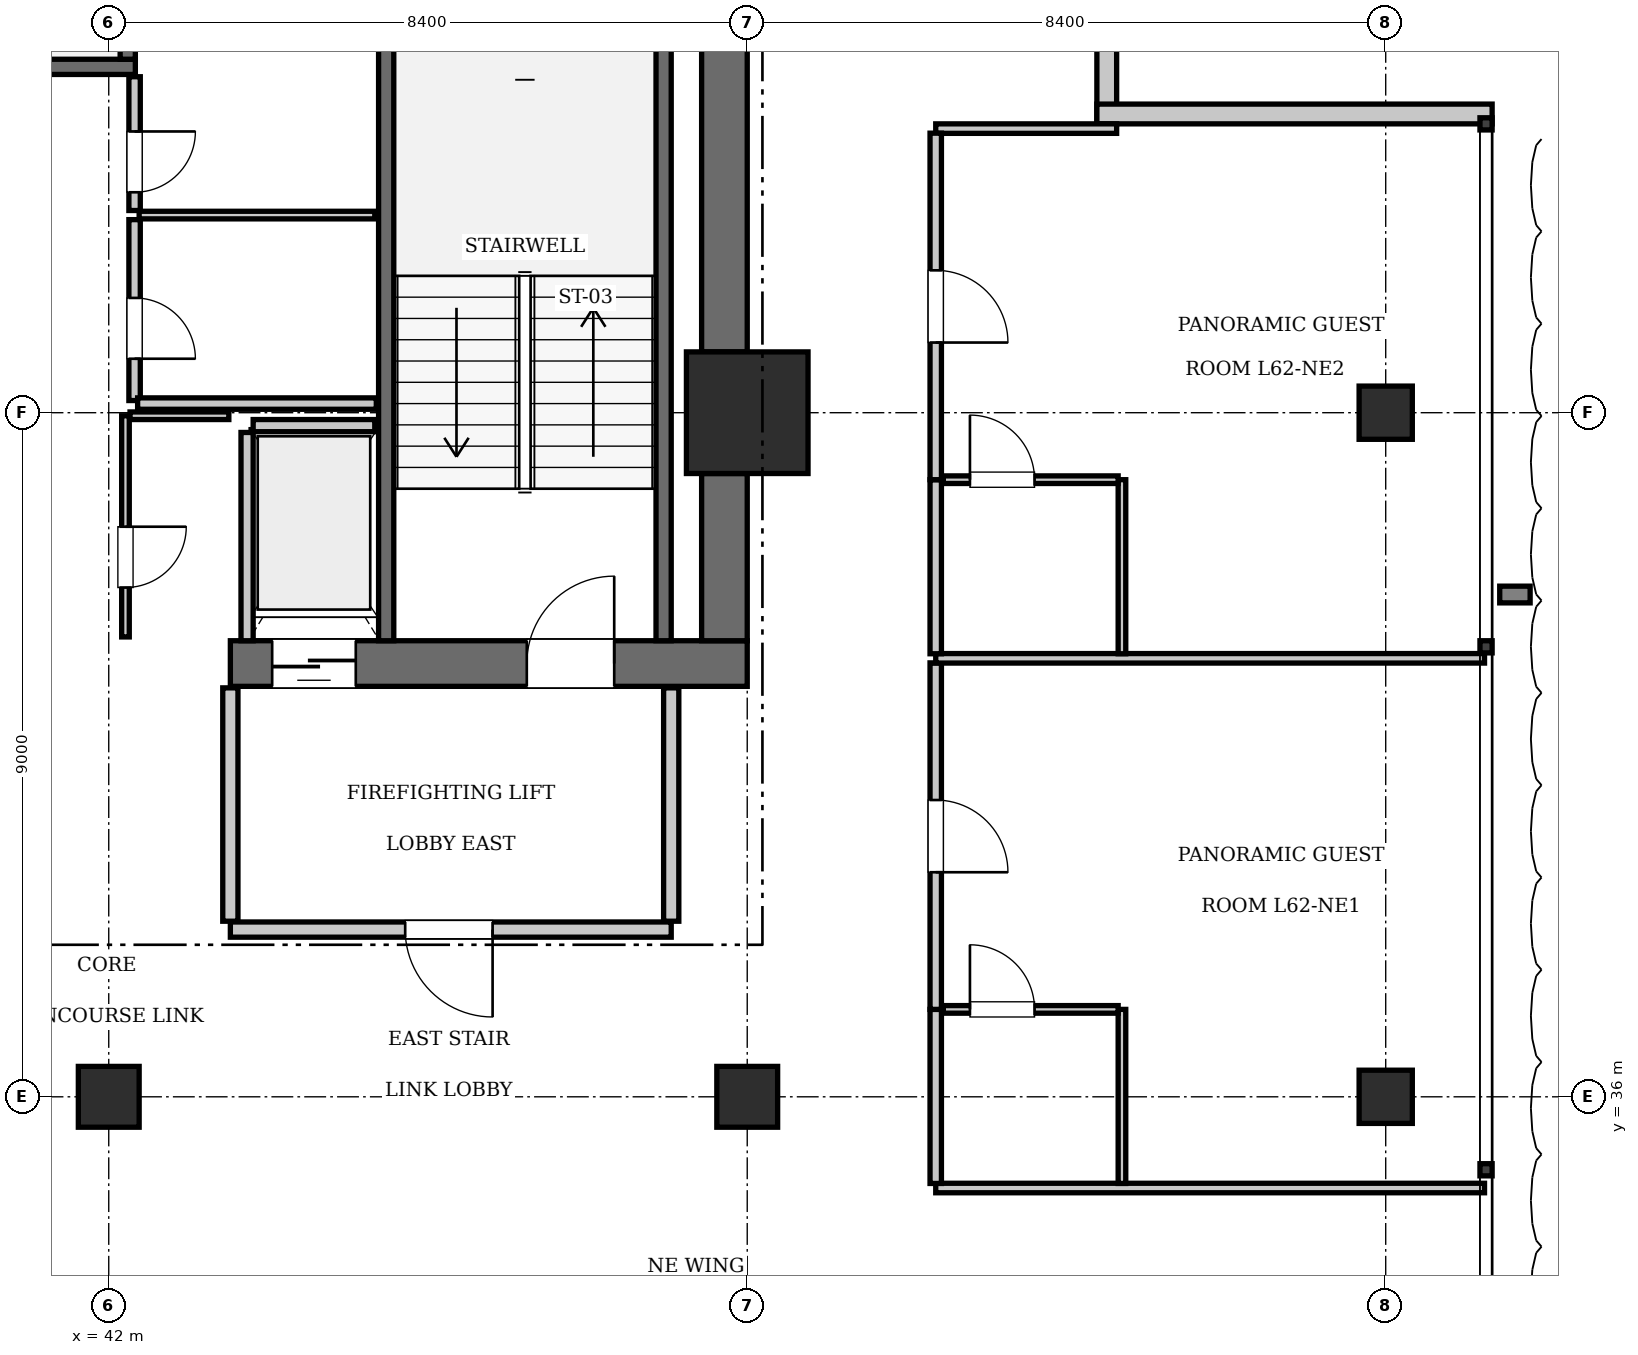
"""IFC4 building model, lengths in metres.
Left out: names, types, materials, properties, quantities, classifications, styles, units other than length and angle.
Written with IfcOpenShell. Run it as: python <this file> out.ifc"""

import sys

from ifc_helpers import new_model, si_unit, direction, frame, frame_2d, origin, origin_2d, place, context, subcontext, project, spatial, rectangle, extrude, element, fill, save


model = new_model("IFC4")
c1 = context("Model", 3, precision=1e-05, world=origin(), true_north=direction((0.0, 1.0)))
c2 = subcontext(c1, "Body", "Model", "MODEL_VIEW")
j1 = project(units=[si_unit("LENGTHUNIT", "METRE"), si_unit("PLANEANGLEUNIT", "RADIAN")], contexts=[c1])
p1 = place(None, origin())
s1 = spatial("IfcSite", under=j1, at=p1, CompositionType="ELEMENT")
p2 = place(p1, origin())
s2 = spatial("IfcBuilding", under=s1, at=p2, CompositionType="ELEMENT")
p3 = place(p2, frame((0.0, 0.0, 254.8)))
s3 = spatial("IfcBuildingStorey", under=s2, at=p3, CompositionType="ELEMENT", Elevation=254.8)
p4 = place(p3, frame((50.4, 45.0, 0.0), z_axis=(0.0, 0.0, 1.0), x_axis=(1.0, 0.0, 0.0)))
e1 = element("IfcColumn", 1, at=p4, inside=s3, PredefinedType="COLUMN", context=c2, shape_type="SweptSolid", body=[
    extrude(rectangle(XDim=1.6, YDim=1.6, at=origin_2d()), origin(), (0.0, 0.0, 1.0), 3.85),
])
p5 = place(p3, frame((43.6, 41.7, 0.0), z_axis=(0.0, 0.0, 1.0), x_axis=(1.0, 0.0, 0.0)))
e2 = element("IfcWall", 2, at=p5, inside=s3, PredefinedType="SHEAR", context=c2, shape_type="SweptSolid", body=[
    extrude(rectangle(XDim=6.8, YDim=0.6, at=frame_2d((3.4, 0.0))), origin(), (0.0, 0.0, 1.0), 3.85),
])
p6 = place(p5, frame((3.9, 0.0, 0.0)))
e3 = element("IfcOpeningElement", 3, at=p6, cuts=e2, PredefinedType="OPENING", context=c2, shape_type="SweptSolid", body=[
    extrude(rectangle(XDim=1.15, YDim=2.15, at=frame_2d((0.575, 1.075))), frame((0.0, 0.31, 0.0), z_axis=(0.0, -1.0, 0.0), x_axis=(1.0, 0.0, 0.0)), (0.0, 0.0, 1.0), 0.62),
])
p7 = place(p5, frame((0.55, 0.0, 0.0)))
e4 = element("IfcOpeningElement", 4, at=p7, cuts=e2, PredefinedType="OPENING", context=c2, shape_type="SweptSolid", body=[
    extrude(rectangle(XDim=1.1, YDim=2.2, at=frame_2d((0.55, 1.1))), frame((0.0, 0.31, 0.0), z_axis=(0.0, -1.0, 0.0), x_axis=(1.0, 0.0, 0.0)), (0.0, 0.0, 1.0), 0.62),
])
p8 = place(p3, frame((50.1, 42.0, 0.0), z_axis=(0.0, 0.0, 1.0), x_axis=(0.0, 1.0, 0.0)))
e5 = element("IfcWall", 5, at=p8, inside=s3, PredefinedType="SHEAR", context=c2, shape_type="SweptSolid", body=[
    extrude(rectangle(XDim=2.2, YDim=0.6, at=frame_2d((1.1, 0.0))), origin(), (0.0, 0.0, 1.0), 3.85),
])
p9 = place(p3, frame((50.1, 45.8, 0.0), z_axis=(0.0, 0.0, 1.0), x_axis=(0.0, 1.0, 0.0)))
e6 = element("IfcWall", 6, at=p9, inside=s3, PredefinedType="SHEAR", context=c2, shape_type="SweptSolid", body=[
    extrude(rectangle(XDim=7.6, YDim=0.6, at=frame_2d((3.8, 0.0))), origin(), (0.0, 0.0, 1.0), 3.85),
])
for number, where, z_axis, x_axis in (
    (7, (42.0, 36.0, 0.0), (0.0, 0.0, 1.0), (1.0, 0.0, 0.0)),
    (8, (50.4, 36.0, 0.0), (0.0, 0.0, 1.0), (1.0, 0.0, 0.0)),
):
    element("IfcColumn", number, at=place(p3, frame(where, z_axis=z_axis, x_axis=x_axis)), inside=s3, PredefinedType="COLUMN", context=c2, shape_type="SweptSolid", body=[
        extrude(rectangle(XDim=0.8, YDim=0.8, at=origin_2d()), origin(), (0.0, 0.0, 1.0), 3.85),
    ])
for number, where, z_axis, x_axis in (
    (9, (58.8, 36.0, 0.0), (0.0, 0.0, 1.0), (1.0, 0.0, 0.0)),
    (10, (58.8, 45.0, 0.0), (0.0, 0.0, 1.0), (1.0, 0.0, 0.0)),
):
    element("IfcColumn", number, at=place(p3, frame(where, z_axis=z_axis, x_axis=x_axis)), inside=s3, PredefinedType="COLUMN", context=c2, shape_type="SweptSolid", body=[
        extrude(rectangle(XDim=0.7, YDim=0.7, at=origin_2d()), origin(), (0.0, 0.0, 1.0), 3.85),
    ])
p10 = place(p3, frame((33.25, 49.55, 0.0), z_axis=(0.0, 0.0, 1.0), x_axis=(1.0, 0.0, 0.0)))
e11 = element("IfcWall", 11, at=p10, inside=s3, PredefinedType="SOLIDWALL", context=c2, shape_type="SweptSolid", body=[
    extrude(rectangle(XDim=9.1, YDim=0.2, at=frame_2d((4.55, 0.0))), origin(), (0.0, 0.0, 1.0), 3.61),
])
p11 = place(p3, frame((42.25, 49.65, 0.0), z_axis=(0.0, 0.0, 1.0), x_axis=(0.0, 1.0, 0.0)))
e12 = element("IfcWall", 12, at=p11, inside=s3, PredefinedType="SOLIDWALL", context=c2, shape_type="SweptSolid", body=[
    extrude(rectangle(XDim=3.75, YDim=0.2, at=frame_2d((1.875, 0.0))), origin(), (0.0, 0.0, 1.0), 3.61),
])
p12 = place(p3, frame((45.65, 42.0, 0.0), z_axis=(0.0, 0.0, 1.0), x_axis=(0.0, 1.0, 0.0)))
e13 = element("IfcWall", 13, at=p12, inside=s3, PredefinedType="SOLIDWALL", context=c2, shape_type="SweptSolid", body=[
    extrude(rectangle(XDim=9.15, YDim=0.2, at=frame_2d((4.575, 0.0))), origin(), (0.0, 0.0, 1.0), 3.61),
])
p13 = place(p3, frame((49.3, 42.0, 0.0), z_axis=(0.0, 0.0, 1.0), x_axis=(0.0, 1.0, 0.0)))
e14 = element("IfcWall", 14, at=p13, inside=s3, PredefinedType="SOLIDWALL", context=c2, shape_type="SweptSolid", body=[
    extrude(rectangle(XDim=9.12, YDim=0.2, at=frame_2d((4.56, 0.0))), origin(), (0.0, 0.0, 1.0), 3.61),
])
p14 = place(p3, frame((43.9, 44.83, 0.0), z_axis=(0.0, 0.0, 1.0), x_axis=(1.0, 0.0, 0.0)))
e15 = element("IfcWall", 15, at=p14, inside=s3, PredefinedType="SOLIDWALL", context=c2, shape_type="SweptSolid", body=[
    extrude(rectangle(XDim=1.6, YDim=0.16, at=frame_2d((0.8, 0.0))), origin(), (0.0, 0.0, 1.0), 3.61),
])
p15 = place(p3, frame((43.82, 42.0, 0.0), z_axis=(0.0, 0.0, 1.0), x_axis=(0.0, 1.0, 0.0)))
e16 = element("IfcWall", 16, at=p15, inside=s3, PredefinedType="SOLIDWALL", context=c2, shape_type="SweptSolid", body=[
    extrude(rectangle(XDim=2.74, YDim=0.16, at=frame_2d((1.37, 0.0))), origin(), (0.0, 0.0, 1.0), 3.61),
])
for number, where, z_axis, x_axis in (
    (17, (55.13, 54.0, 0.0), (0.0, 0.0, 1.0), (0.0, -1.0, 0.0)),
    (18, (55.0, 48.93, 0.0), (0.0, 0.0, 1.0), (1.0, 0.0, 0.0)),
):
    element("IfcWall", number, at=place(p3, frame(where, z_axis=z_axis, x_axis=x_axis)), inside=s3, PredefinedType="SOLIDWALL", context=c2, shape_type="SweptSolid", body=[
        extrude(rectangle(XDim=5.2, YDim=0.26, at=frame_2d((2.6, 0.0))), origin(), (0.0, 0.0, 1.0), 3.61),
    ])
p16 = place(p3, frame((43.6, 38.2, 0.0), z_axis=(0.0, 0.0, 1.0), x_axis=(1.0, 0.0, 0.0)))
e19 = element("IfcWall", 19, at=p16, inside=s3, PredefinedType="PARTITIONING", context=c2, shape_type="SweptSolid", body=[
    extrude(rectangle(XDim=5.8, YDim=0.2, at=frame_2d((2.9, 0.0))), origin(), (0.0, 0.0, 1.0), 3.61),
])
p17 = place(p16, frame((2.3, 0.0, 0.0)))
e20 = element("IfcOpeningElement", 20, at=p17, cuts=e19, PredefinedType="OPENING", context=c2, shape_type="SweptSolid", body=[
    extrude(rectangle(XDim=1.15, YDim=2.15, at=frame_2d((0.575, 1.075))), frame((0.0, 0.11, 0.0), z_axis=(0.0, -1.0, 0.0), x_axis=(1.0, 0.0, 0.0)), (0.0, 0.0, 1.0), 0.22),
])
for number, where, z_axis, x_axis in (
    (21, (43.6, 38.31, 0.0), (0.0, 0.0, 1.0), (0.0, 1.0, 0.0)),
    (22, (49.4, 38.31, 0.0), (0.0, 0.0, 1.0), (0.0, 1.0, 0.0)),
):
    element("IfcWall", number, at=place(p3, frame(where, z_axis=z_axis, x_axis=x_axis)), inside=s3, PredefinedType="PARTITIONING", context=c2, shape_type="SweptSolid", body=[
        extrude(rectangle(XDim=3.07, YDim=0.2, at=frame_2d((1.535, 0.0))), origin(), (0.0, 0.0, 1.0), 3.61),
    ])
p18 = place(p3, frame((42.22, 42.05, 0.0), z_axis=(0.0, 0.0, 1.0), x_axis=(0.0, 1.0, 0.0)))
e23 = element("IfcWall", 23, at=p18, inside=s3, PredefinedType="PARTITIONING", context=c2, shape_type="SweptSolid", body=[
    extrude(rectangle(XDim=2.91, YDim=0.1, at=frame_2d((1.455, 0.0))), origin(), (0.0, 0.0, 1.0), 3.61),
])
p19 = place(p18, frame((0.65, 0.0, 0.0)))
e24 = element("IfcOpeningElement", 24, at=p19, cuts=e23, PredefinedType="OPENING", context=c2, shape_type="SweptSolid", body=[
    extrude(rectangle(XDim=0.8, YDim=2.05, at=frame_2d((0.4, 1.025))), frame((0.0, 0.06, 0.0), z_axis=(0.0, -1.0, 0.0), x_axis=(1.0, 0.0, 0.0)), (0.0, 0.0, 1.0), 0.12),
])
p20 = place(p3, frame((42.28, 44.96, 0.0), z_axis=(0.0, 0.0, 1.0), x_axis=(1.0, 0.0, 0.0)))
e25 = element("IfcWall", 25, at=p20, inside=s3, PredefinedType="PARTITIONING", context=c2, shape_type="SweptSolid", body=[
    extrude(rectangle(XDim=1.3, YDim=0.1, at=frame_2d((0.65, 0.0))), origin(), (0.0, 0.0, 1.0), 3.61),
])
p21 = place(p3, frame((42.34, 45.16, 0.0), z_axis=(0.0, 0.0, 1.0), x_axis=(0.0, 1.0, 0.0)))
e26 = element("IfcWall", 26, at=p21, inside=s3, PredefinedType="PARTITIONING", context=c2, shape_type="SweptSolid", body=[
    extrude(rectangle(XDim=2.38, YDim=0.15, at=frame_2d((1.19, 0.0))), origin(), (0.0, 0.0, 1.0), 3.61),
])
p22 = place(p21, frame((0.55, 0.0, 0.0)))
e27 = element("IfcOpeningElement", 27, at=p22, cuts=e26, PredefinedType="OPENING", context=c2, shape_type="SweptSolid", body=[
    extrude(rectangle(XDim=0.8, YDim=2.05, at=frame_2d((0.4, 1.025))), frame((0.0, 0.085, 0.0), z_axis=(0.0, -1.0, 0.0), x_axis=(1.0, 0.0, 0.0)), (0.0, 0.0, 1.0), 0.17),
])
p23 = place(p3, frame((42.34, 47.66, 0.0), z_axis=(0.0, 0.0, 1.0), x_axis=(0.0, 1.0, 0.0)))
e28 = element("IfcWall", 28, at=p23, inside=s3, PredefinedType="PARTITIONING", context=c2, shape_type="SweptSolid", body=[
    extrude(rectangle(XDim=1.76, YDim=0.15, at=frame_2d((0.88, 0.0))), origin(), (0.0, 0.0, 1.0), 3.61),
])
p24 = place(p23, frame((0.24, 0.0, 0.0)))
e29 = element("IfcOpeningElement", 29, at=p24, cuts=e28, PredefinedType="OPENING", context=c2, shape_type="SweptSolid", body=[
    extrude(rectangle(XDim=0.8, YDim=2.05, at=frame_2d((0.4, 1.025))), frame((0.0, 0.085, 0.0), z_axis=(0.0, -1.0, 0.0), x_axis=(1.0, 0.0, 0.0)), (0.0, 0.0, 1.0), 0.17),
])
p25 = place(p3, frame((42.4, 47.6, 0.0), z_axis=(0.0, 0.0, 1.0), x_axis=(1.0, 0.0, 0.0)))
e30 = element("IfcWall", 30, at=p25, inside=s3, PredefinedType="PARTITIONING", context=c2, shape_type="SweptSolid", body=[
    extrude(rectangle(XDim=3.1, YDim=0.1, at=frame_2d((1.55, 0.0))), origin(), (0.0, 0.0, 1.0), 3.61),
])
p26 = place(p3, frame((42.38, 45.12, 0.0), z_axis=(0.0, 0.0, 1.0), x_axis=(1.0, 0.0, 0.0)))
e31 = element("IfcWall", 31, at=p26, inside=s3, PredefinedType="PARTITIONING", context=c2, shape_type="SweptSolid", body=[
    extrude(rectangle(XDim=3.14, YDim=0.15, at=frame_2d((1.57, 0.0))), origin(), (0.0, 0.0, 1.0), 3.61),
])
p27 = place(p3, frame((52.88, 34.8, 0.0), z_axis=(0.0, 0.0, 1.0), x_axis=(1.0, 0.0, 0.0)))
e32 = element("IfcWall", 32, at=p27, inside=s3, PredefinedType="PARTITIONING", context=c2, shape_type="SweptSolid", body=[
    extrude(rectangle(XDim=7.22, YDim=0.125, at=frame_2d((3.61, 0.0))), origin(), (0.0, 0.0, 1.0), 3.61),
])
p28 = place(p3, frame((52.88, 48.738, 0.0), z_axis=(0.0, 0.0, 1.0), x_axis=(1.0, 0.0, 0.0)))
e33 = element("IfcWall", 33, at=p28, inside=s3, PredefinedType="PARTITIONING", context=c2, shape_type="SweptSolid", body=[
    extrude(rectangle(XDim=2.38, YDim=0.125, at=frame_2d((1.19, 0.0))), origin(), (0.0, 0.0, 1.0), 3.61),
])
p29 = place(p3, frame((52.88, 34.86, 0.0), z_axis=(0.0, 0.0, 1.0), x_axis=(0.0, 1.0, 0.0)))
e34 = element("IfcWall", 34, at=p29, inside=s3, PredefinedType="PARTITIONING", context=c2, shape_type="SweptSolid", body=[
    extrude(rectangle(XDim=2.29, YDim=0.15, at=frame_2d((1.145, 0.0))), origin(), (0.0, 0.0, 1.0), 3.61),
])
p30 = place(p3, frame((52.88, 37.15, 0.0), z_axis=(0.0, 0.0, 1.0), x_axis=(0.0, 1.0, 0.0)))
e35 = element("IfcWall", 35, at=p30, inside=s3, PredefinedType="PARTITIONING", context=c2, shape_type="SweptSolid", body=[
    extrude(rectangle(XDim=4.559, YDim=0.15, at=frame_2d((2.279, 0.0))), origin(), (0.0, 0.0, 1.0), 3.61),
])
p31 = place(p30, frame((1.804, 0.0, 0.0)))
e36 = element("IfcOpeningElement", 36, at=p31, cuts=e35, PredefinedType="OPENING", context=c2, shape_type="SweptSolid", body=[
    extrude(rectangle(XDim=0.95, YDim=2.15, at=frame_2d((0.475, 1.075))), frame((0.0, 0.085, 0.0), z_axis=(0.0, -1.0, 0.0), x_axis=(1.0, 0.0, 0.0)), (0.0, 0.0, 1.0), 0.17),
])
p32 = place(p3, frame((55.33, 34.86, 0.0), z_axis=(0.0, 0.0, 1.0), x_axis=(0.0, 1.0, 0.0)))
e37 = element("IfcWall", 37, at=p32, inside=s3, PredefinedType="PARTITIONING", context=c2, shape_type="SweptSolid", body=[
    extrude(rectangle(XDim=2.29, YDim=0.1, at=frame_2d((1.145, 0.0))), origin(), (0.0, 0.0, 1.0), 3.61),
])
p33 = place(p3, frame((52.98, 37.15, 0.0), z_axis=(0.0, 0.0, 1.0), x_axis=(1.0, 0.0, 0.0)))
e38 = element("IfcWall", 38, at=p33, inside=s3, PredefinedType="PARTITIONING", context=c2, shape_type="SweptSolid", body=[
    extrude(rectangle(XDim=2.3, YDim=0.1, at=frame_2d((1.15, 0.0))), origin(), (0.0, 0.0, 1.0), 3.61),
])
p34 = place(p33, frame((0.35, 0.0, 0.0)))
e39 = element("IfcOpeningElement", 39, at=p34, cuts=e38, PredefinedType="OPENING", context=c2, shape_type="SweptSolid", body=[
    extrude(rectangle(XDim=0.85, YDim=2.1, at=frame_2d((0.425, 1.05))), frame((0.0, 0.06, 0.0), z_axis=(0.0, -1.0, 0.0), x_axis=(1.0, 0.0, 0.0)), (0.0, 0.0, 1.0), 0.12),
])
p35 = place(p3, frame((52.88, 41.769, 0.0), z_axis=(0.0, 0.0, 1.0), x_axis=(1.0, 0.0, 0.0)))
e40 = element("IfcWall", 40, at=p35, inside=s3, PredefinedType="PARTITIONING", context=c2, shape_type="SweptSolid", body=[
    extrude(rectangle(XDim=7.22, YDim=0.125, at=frame_2d((3.61, 0.0))), origin(), (0.0, 0.0, 1.0), 3.61),
])
p36 = place(p3, frame((52.88, 41.829, 0.0), z_axis=(0.0, 0.0, 1.0), x_axis=(0.0, 1.0, 0.0)))
e41 = element("IfcWall", 41, at=p36, inside=s3, PredefinedType="PARTITIONING", context=c2, shape_type="SweptSolid", body=[
    extrude(rectangle(XDim=2.29, YDim=0.15, at=frame_2d((1.145, 0.0))), origin(), (0.0, 0.0, 1.0), 3.61),
])
p37 = place(p3, frame((52.88, 44.119, 0.0), z_axis=(0.0, 0.0, 1.0), x_axis=(0.0, 1.0, 0.0)))
e42 = element("IfcWall", 42, at=p37, inside=s3, PredefinedType="PARTITIONING", context=c2, shape_type="SweptSolid", body=[
    extrude(rectangle(XDim=4.559, YDim=0.15, at=frame_2d((2.279, 0.0))), origin(), (0.0, 0.0, 1.0), 3.61),
])
p38 = place(p37, frame((1.804, 0.0, 0.0)))
e43 = element("IfcOpeningElement", 43, at=p38, cuts=e42, PredefinedType="OPENING", context=c2, shape_type="SweptSolid", body=[
    extrude(rectangle(XDim=0.95, YDim=2.15, at=frame_2d((0.475, 1.075))), frame((0.0, 0.085, 0.0), z_axis=(0.0, -1.0, 0.0), x_axis=(1.0, 0.0, 0.0)), (0.0, 0.0, 1.0), 0.17),
])
p39 = place(p3, frame((55.33, 41.829, 0.0), z_axis=(0.0, 0.0, 1.0), x_axis=(0.0, 1.0, 0.0)))
e44 = element("IfcWall", 44, at=p39, inside=s3, PredefinedType="PARTITIONING", context=c2, shape_type="SweptSolid", body=[
    extrude(rectangle(XDim=2.29, YDim=0.1, at=frame_2d((1.145, 0.0))), origin(), (0.0, 0.0, 1.0), 3.61),
])
p40 = place(p3, frame((52.98, 44.119, 0.0), z_axis=(0.0, 0.0, 1.0), x_axis=(1.0, 0.0, 0.0)))
e45 = element("IfcWall", 45, at=p40, inside=s3, PredefinedType="PARTITIONING", context=c2, shape_type="SweptSolid", body=[
    extrude(rectangle(XDim=2.3, YDim=0.1, at=frame_2d((1.15, 0.0))), origin(), (0.0, 0.0, 1.0), 3.61),
])
p41 = place(p40, frame((0.35, 0.0, 0.0)))
e46 = element("IfcOpeningElement", 46, at=p41, cuts=e45, PredefinedType="OPENING", context=c2, shape_type="SweptSolid", body=[
    extrude(rectangle(XDim=0.85, YDim=2.1, at=frame_2d((0.425, 1.05))), frame((0.0, 0.06, 0.0), z_axis=(0.0, -1.0, 0.0), x_axis=(1.0, 0.0, 0.0)), (0.0, 0.0, 1.0), 0.12),
])
p42 = place(p6, origin())
e47 = element("IfcDoor", 47, at=p42, inside=s3, OperationType="SINGLE_SWING_RIGHT", PredefinedType="DOOR", context=c2, shape_type="SweptSolid", body=[
    extrude(rectangle(XDim=1.15, YDim=2.15, at=frame_2d((0.575, 1.075))), frame((0.0, 0.025, 0.0), z_axis=(0.0, -1.0, 0.0), x_axis=(1.0, 0.0, 0.0)), (0.0, 0.0, 1.0), 0.05),
])
fill(e3, e47)
p43 = place(p7, frame((1.1, 0.0, 0.0), z_axis=(0.0, 0.0, 1.0), x_axis=(-1.0, 0.0, 0.0)))
e48 = element("IfcDoor", 48, at=p43, inside=s3, OperationType="SLIDING_TO_LEFT", PredefinedType="DOOR", context=c2, shape_type="SweptSolid", body=[
    extrude(rectangle(XDim=1.1, YDim=2.2, at=frame_2d((0.55, 1.1))), frame((0.0, 0.025, 0.0), z_axis=(0.0, -1.0, 0.0), x_axis=(1.0, 0.0, 0.0)), (0.0, 0.0, 1.0), 0.05),
])
fill(e4, e48)
p44 = place(p17, frame((1.15, 0.0, 0.0), z_axis=(0.0, 0.0, 1.0), x_axis=(-1.0, 0.0, 0.0)))
e49 = element("IfcDoor", 49, at=p44, inside=s3, OperationType="SINGLE_SWING_LEFT", PredefinedType="DOOR", context=c2, shape_type="SweptSolid", body=[
    extrude(rectangle(XDim=1.15, YDim=2.15, at=frame_2d((0.575, 1.075))), frame((0.0, 0.025, 0.0), z_axis=(0.0, -1.0, 0.0), x_axis=(1.0, 0.0, 0.0)), (0.0, 0.0, 1.0), 0.05),
])
fill(e20, e49)
p45 = place(p19, frame((0.8, 0.0, 0.0), z_axis=(0.0, 0.0, 1.0), x_axis=(-1.0, 0.0, 0.0)))
e50 = element("IfcDoor", 50, at=p45, inside=s3, OperationType="SINGLE_SWING_LEFT", PredefinedType="DOOR", context=c2, shape_type="SweptSolid", body=[
    extrude(rectangle(XDim=0.8, YDim=2.05, at=frame_2d((0.4, 1.025))), frame((0.0, 0.025, 0.0), z_axis=(0.0, -1.0, 0.0), x_axis=(1.0, 0.0, 0.0)), (0.0, 0.0, 1.0), 0.05),
])
fill(e24, e50)
p46 = place(p22, frame((0.8, 0.0, 0.0), z_axis=(0.0, 0.0, 1.0), x_axis=(-1.0, 0.0, 0.0)))
e51 = element("IfcDoor", 51, at=p46, inside=s3, OperationType="SINGLE_SWING_RIGHT", PredefinedType="DOOR", context=c2, shape_type="SweptSolid", body=[
    extrude(rectangle(XDim=0.8, YDim=2.05, at=frame_2d((0.4, 1.025))), frame((0.0, 0.025, 0.0), z_axis=(0.0, -1.0, 0.0), x_axis=(1.0, 0.0, 0.0)), (0.0, 0.0, 1.0), 0.05),
])
fill(e27, e51)
p47 = place(p24, frame((0.8, 0.0, 0.0), z_axis=(0.0, 0.0, 1.0), x_axis=(-1.0, 0.0, 0.0)))
e52 = element("IfcDoor", 52, at=p47, inside=s3, OperationType="SINGLE_SWING_LEFT", PredefinedType="DOOR", context=c2, shape_type="SweptSolid", body=[
    extrude(rectangle(XDim=0.8, YDim=2.05, at=frame_2d((0.4, 1.025))), frame((0.0, 0.025, 0.0), z_axis=(0.0, -1.0, 0.0), x_axis=(1.0, 0.0, 0.0)), (0.0, 0.0, 1.0), 0.05),
])
fill(e29, e52)
p48 = place(p34, origin())
e53 = element("IfcDoor", 53, at=p48, inside=s3, OperationType="SINGLE_SWING_LEFT", PredefinedType="DOOR", context=c2, shape_type="SweptSolid", body=[
    extrude(rectangle(XDim=0.85, YDim=2.1, at=frame_2d((0.425, 1.05))), frame((0.0, 0.025, 0.0), z_axis=(0.0, -1.0, 0.0), x_axis=(1.0, 0.0, 0.0)), (0.0, 0.0, 1.0), 0.05),
])
fill(e39, e53)
p49 = place(p31, frame((0.95, 0.0, 0.0), z_axis=(0.0, 0.0, 1.0), x_axis=(-1.0, 0.0, 0.0)))
e54 = element("IfcDoor", 54, at=p49, inside=s3, OperationType="SINGLE_SWING_RIGHT", PredefinedType="DOOR", context=c2, shape_type="SweptSolid", body=[
    extrude(rectangle(XDim=0.95, YDim=2.15, at=frame_2d((0.475, 1.075))), frame((0.0, 0.025, 0.0), z_axis=(0.0, -1.0, 0.0), x_axis=(1.0, 0.0, 0.0)), (0.0, 0.0, 1.0), 0.05),
])
fill(e36, e54)
p50 = place(p41, origin())
e55 = element("IfcDoor", 55, at=p50, inside=s3, OperationType="SINGLE_SWING_LEFT", PredefinedType="DOOR", context=c2, shape_type="SweptSolid", body=[
    extrude(rectangle(XDim=0.85, YDim=2.1, at=frame_2d((0.425, 1.05))), frame((0.0, 0.025, 0.0), z_axis=(0.0, -1.0, 0.0), x_axis=(1.0, 0.0, 0.0)), (0.0, 0.0, 1.0), 0.05),
])
fill(e46, e55)
p51 = place(p38, frame((0.95, 0.0, 0.0), z_axis=(0.0, 0.0, 1.0), x_axis=(-1.0, 0.0, 0.0)))
e56 = element("IfcDoor", 56, at=p51, inside=s3, OperationType="SINGLE_SWING_RIGHT", PredefinedType="DOOR", context=c2, shape_type="SweptSolid", body=[
    extrude(rectangle(XDim=0.95, YDim=2.15, at=frame_2d((0.475, 1.075))), frame((0.0, 0.025, 0.0), z_axis=(0.0, -1.0, 0.0), x_axis=(1.0, 0.0, 0.0)), (0.0, 0.0, 1.0), 0.05),
])
fill(e43, e56)
save(model, sys.argv[1])
